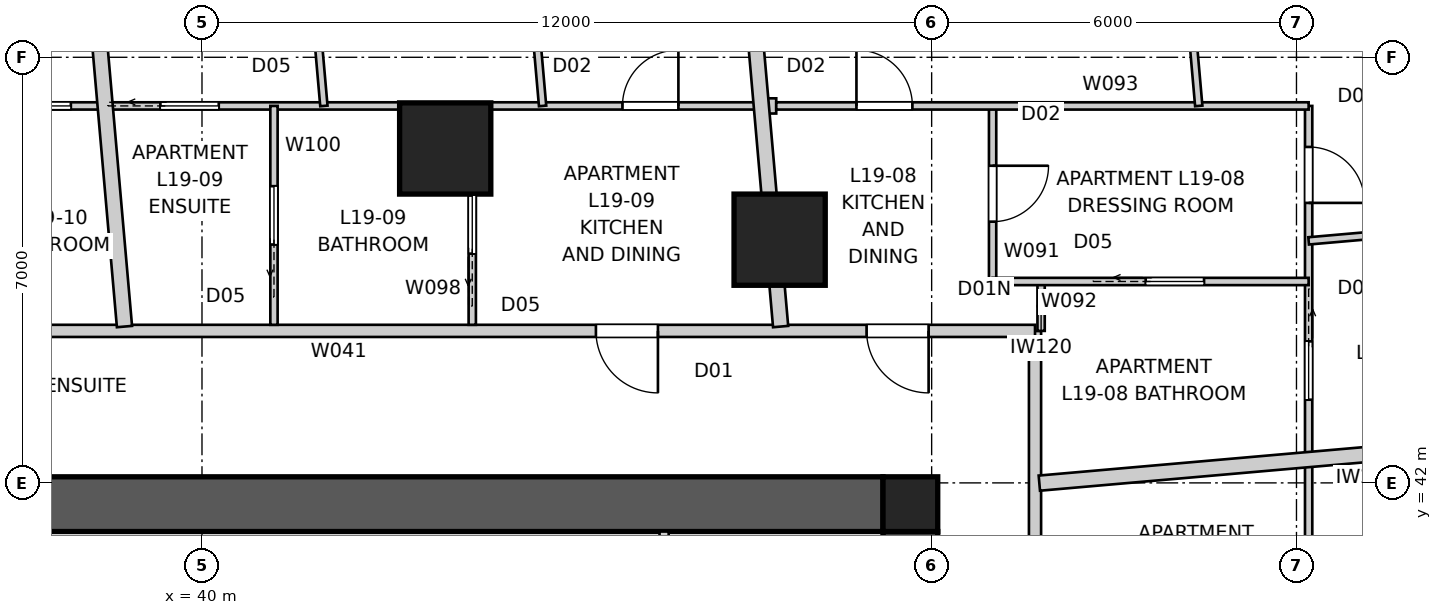
"""IFC4 building model, lengths in metres.
Left out: names, types, materials, properties, quantities, classifications, styles, units other than length and angle.
Written with IfcOpenShell. Run it as: python <this file> out.ifc"""

import sys

from ifc_helpers import new_model, si_unit, direction, frame, frame_2d, origin, origin_2d, place, context, subcontext, project, spatial, polyline, rectangle, outline, extrude, element, fill, save


model = new_model("IFC4")
c1 = context("Model", 3, precision=1e-05, world=origin(), true_north=direction((0.0, 1.0)))
c2 = subcontext(c1, "Body", "Model", "MODEL_VIEW")
j1 = project(units=[si_unit("LENGTHUNIT", "METRE"), si_unit("PLANEANGLEUNIT", "RADIAN")], contexts=[c1])
p1 = place(None, origin())
s1 = spatial("IfcSite", under=j1, at=p1, CompositionType="ELEMENT")
p2 = place(p1, origin())
s2 = spatial("IfcBuilding", under=s1, at=p2, CompositionType="ELEMENT")
p3 = place(p2, frame((0.0, 0.0, 71.0)))
s3 = spatial("IfcBuildingStorey", under=s2, at=p3, CompositionType="ELEMENT", Elevation=71.0)
p4 = place(p3, frame((28.8, 41.65, 0.0), z_axis=(0.0, 0.0, 1.0), x_axis=(1.0, 0.0, 0.0)))
e1 = element("IfcWall", 1, at=p4, inside=s3, PredefinedType="SHEAR", context=c2, shape_type="SweptSolid", body=[
    extrude(outline(polyline([(0.0, -0.45), (22.4, -0.45), (22.4, -0.025), (22.85, -0.025), (22.85, 0.025), (22.4, 0.025), (22.4, 0.45), (0.0, 0.45), (0.0, 0.025), (-0.45, 0.025), (-0.45, -0.025), (0.0, -0.025), (0.0, -0.45)])), origin(), (0.0, 0.0, 1.0), 3.4),
])
p5 = place(p3, frame((51.65, 18.8, 0.0), z_axis=(0.0, 0.0, 1.0), x_axis=(0.0, 1.0, 0.0)))
e2 = element("IfcWall", 2, at=p5, inside=s3, PredefinedType="SHEAR", context=c2, shape_type="SweptSolid", body=[
    extrude(outline(polyline([(0.0, -0.45), (22.4, -0.45), (22.4, -0.025), (22.85, -0.025), (22.85, 0.025), (22.4, 0.025), (22.4, 0.45), (0.0, 0.45), (0.0, 0.025), (-0.45, 0.025), (-0.45, -0.025), (0.0, -0.025), (0.0, -0.45)])), origin(), (0.0, 0.0, 1.0), 3.4),
])
p6 = place(p5, frame((11.14, 0.0, 0.0)))
e3 = element("IfcOpeningElement", 3, at=p6, cuts=e2, PredefinedType="OPENING", context=c2, shape_type="SweptSolid", body=[
    extrude(rectangle(XDim=1.02, YDim=2.4, at=frame_2d((0.51, 1.2))), frame((0.0, 0.46, 0.0), z_axis=(0.0, -1.0, 0.0), x_axis=(1.0, 0.0, 0.0)), (0.0, 0.0, 1.0), 0.92),
])
p7 = place(p3, frame((51.65, 41.65, 0.0), z_axis=(0.0, 0.0, 1.0), x_axis=(1.0, 0.0, 0.0)))
e4 = element("IfcColumn", 4, at=p7, inside=s3, PredefinedType="COLUMN", context=c2, shape_type="SweptSolid", body=[
    extrude(rectangle(XDim=0.9, YDim=0.9, at=origin_2d()), origin(), (0.0, 0.0, 1.0), 3.4),
])
for number, where, z_axis, x_axis in (
    (5, (49.5, 46.0, 0.0), (0.0, 0.0, 1.0), (1.0, 0.0, 0.0)),
    (6, (44.0, 47.5, 0.0), (0.0, 0.0, 1.0), (1.0, 0.0, 0.0)),
):
    element("IfcColumn", number, at=place(p3, frame(where, z_axis=z_axis, x_axis=x_axis)), inside=s3, PredefinedType="COLUMN", context=c2, shape_type="SweptSolid", body=[
        extrude(rectangle(XDim=1.5, YDim=1.5, at=origin_2d()), origin(), (0.0, 0.0, 1.0), 3.4),
    ])
p8 = place(p3, frame((53.7, 16.3, 0.0), z_axis=(0.0, 0.0, 1.0), x_axis=(0.0, 1.0, 0.0)))
e7 = element("IfcWall", 7, at=p8, inside=s3, PredefinedType="PARTITIONING", context=c2, shape_type="SweptSolid", body=[
    extrude(rectangle(XDim=28.2, YDim=0.2, at=frame_2d((14.1, 0.0))), origin(), (0.0, 0.0, 1.0), 3.2),
])
p9 = place(p8, frame((15.716, 0.0, 0.0)))
e8 = element("IfcOpeningElement", 8, at=p9, cuts=e7, PredefinedType="OPENING", context=c2, shape_type="SweptSolid", body=[
    extrude(rectangle(XDim=1.02, YDim=2.34, at=frame_2d((0.51, 1.17))), frame((0.0, 0.11, 0.0), z_axis=(0.0, -1.0, 0.0), x_axis=(1.0, 0.0, 0.0)), (0.0, 0.0, 1.0), 0.22),
])
p10 = place(p8, frame((5.572, 0.0, 0.0)))
e9 = element("IfcOpeningElement", 9, at=p10, cuts=e7, PredefinedType="OPENING", context=c2, shape_type="SweptSolid", body=[
    extrude(rectangle(XDim=1.02, YDim=2.34, at=frame_2d((0.51, 1.17))), frame((0.0, 0.11, 0.0), z_axis=(0.0, -1.0, 0.0), x_axis=(1.0, 0.0, 0.0)), (0.0, 0.0, 1.0), 0.22),
])
p11 = place(p8, frame((1.565, 0.0, 0.0)))
e10 = element("IfcOpeningElement", 10, at=p11, cuts=e7, PredefinedType="OPENING", context=c2, shape_type="SweptSolid", body=[
    extrude(rectangle(XDim=1.02, YDim=2.0, at=frame_2d((0.51, 1.0))), frame((0.0, 0.11, 0.0), z_axis=(0.0, -1.0, 0.0), x_axis=(1.0, 0.0, 0.0)), (0.0, 0.0, 1.0), 0.22),
])
p12 = place(p3, frame((53.7, 44.5, 0.0), z_axis=(0.0, 0.0, 1.0), x_axis=(-1.0, 0.0, 0.0)))
e11 = element("IfcWall", 11, at=p12, inside=s3, PredefinedType="PARTITIONING", context=c2, shape_type="SweptSolid", body=[
    extrude(rectangle(XDim=28.2, YDim=0.2, at=frame_2d((14.1, 0.0))), origin(), (0.0, 0.0, 1.0), 3.2),
])
p13 = place(p12, frame((21.321, 0.0, 0.0)))
e12 = element("IfcOpeningElement", 12, at=p13, cuts=e11, PredefinedType="OPENING", context=c2, shape_type="SweptSolid", body=[
    extrude(rectangle(XDim=1.02, YDim=2.34, at=frame_2d((0.51, 1.17))), frame((0.0, 0.11, 0.0), z_axis=(0.0, -1.0, 0.0), x_axis=(1.0, 0.0, 0.0)), (0.0, 0.0, 1.0), 0.22),
])
p14 = place(p12, frame((6.201, 0.0, 0.0)))
e13 = element("IfcOpeningElement", 13, at=p14, cuts=e11, PredefinedType="OPENING", context=c2, shape_type="SweptSolid", body=[
    extrude(rectangle(XDim=1.02, YDim=2.34, at=frame_2d((0.51, 1.17))), frame((0.0, 0.11, 0.0), z_axis=(0.0, -1.0, 0.0), x_axis=(1.0, 0.0, 0.0)), (0.0, 0.0, 1.0), 0.22),
])
p15 = place(p12, frame((1.75, 0.0, 0.0)))
e14 = element("IfcOpeningElement", 14, at=p15, cuts=e11, PredefinedType="OPENING", context=c2, shape_type="SweptSolid", body=[
    extrude(rectangle(XDim=1.02, YDim=2.0, at=frame_2d((0.51, 1.0))), frame((0.0, 0.11, 0.0), z_axis=(0.0, -1.0, 0.0), x_axis=(1.0, 0.0, 0.0)), (0.0, 0.0, 1.0), 0.22),
])
p16 = place(p3, frame((64.466, 42.932, 0.0), z_axis=(0.0, 0.0, 1.0), x_axis=(-0.996193939644, -0.08716441141, 0.0)))
e15 = element("IfcWall", 15, at=p16, inside=s3, PredefinedType="PARTITIONING", context=c2, shape_type="SweptSolid", body=[
    extrude(rectangle(XDim=10.736, YDim=0.25, at=frame_2d((5.368, 0.0))), origin(), (0.0, 0.0, 1.0), 3.2),
])
p17 = place(p3, frame((48.487, 56.34, 0.0), z_axis=(0.0, 0.0, 1.0), x_axis=(0.087168232078, -0.996193605338, 0.0)))
e16 = element("IfcWall", 16, at=p17, inside=s3, PredefinedType="PARTITIONING", context=c2, shape_type="SweptSolid", body=[
    extrude(rectangle(XDim=11.814, YDim=0.25, at=frame_2d((5.907, 0.0))), origin(), (0.0, 0.0, 1.0), 3.2),
])
p18 = place(p3, frame((37.778, 55.403, 0.0), z_axis=(0.0, 0.0, 1.0), x_axis=(0.087140211333, -0.996196056792, 0.0)))
e17 = element("IfcWall", 17, at=p18, inside=s3, PredefinedType="PARTITIONING", context=c2, shape_type="SweptSolid", body=[
    extrude(rectangle(XDim=10.873, YDim=0.25, at=frame_2d((5.437, 0.0))), origin(), (0.0, 0.0, 1.0), 3.2),
])
p19 = place(p3, frame((47.6, 41.2, 0.0), z_axis=(0.0, 0.0, 1.0), x_axis=(0.0, -1.0, 0.0)))
e18 = element("IfcWall", 18, at=p19, inside=s3, PredefinedType="SOLIDWALL", context=c2, shape_type="SweptSolid", body=[
    extrude(rectangle(XDim=5.9, YDim=0.15, at=frame_2d((2.95, 0.0))), origin(), (0.0, 0.0, 1.0), 3.2),
])
p20 = place(p3, frame((49.223, 48.2, 0.0), z_axis=(0.0, 0.0, 1.0), x_axis=(0.999999388167, -0.001106194013, 0.0)))
e19 = element("IfcWall", 19, at=p20, inside=s3, PredefinedType="PARTITIONING", context=c2, shape_type="SweptSolid", body=[
    extrude(rectangle(XDim=0.221, YDim=0.25, at=frame_2d((0.11, 0.0))), origin(), (0.0, 0.0, 1.0), 3.2),
])
p21 = place(p3, frame((58.2, 48.2, 0.0), z_axis=(0.0, 0.0, 1.0), x_axis=(0.0, -1.0, 0.0)))
e20 = element("IfcWall", 20, at=p21, inside=s3, PredefinedType="PARTITIONING", context=c2, shape_type="SweptSolid", body=[
    extrude(rectangle(XDim=20.7, YDim=0.12, at=frame_2d((10.35, 0.0))), origin(), (0.0, 0.0, 1.0), 3.2),
])
p22 = place(p21, frame((15.095, 0.0, 0.0)))
e21 = element("IfcOpeningElement", 21, at=p22, cuts=e20, PredefinedType="OPENING", context=c2, shape_type="SweptSolid", body=[
    extrude(rectangle(XDim=0.92, YDim=2.34, at=frame_2d((0.46, 1.17))), frame((0.0, 0.07, 0.0), z_axis=(0.0, -1.0, 0.0), x_axis=(1.0, 0.0, 0.0)), (0.0, 0.0, 1.0), 0.14),
])
p23 = place(p21, frame((18.521, 0.0, 0.0)))
e22 = element("IfcOpeningElement", 22, at=p23, cuts=e20, PredefinedType="OPENING", context=c2, shape_type="SweptSolid", body=[
    extrude(rectangle(XDim=0.96, YDim=2.1, at=frame_2d((0.48, 1.05))), frame((0.0, 0.07, 0.0), z_axis=(0.0, -1.0, 0.0), x_axis=(1.0, 0.0, 0.0)), (0.0, 0.0, 1.0), 0.14),
])
p24 = place(p21, frame((0.675, 0.0, 0.0)))
e23 = element("IfcOpeningElement", 23, at=p24, cuts=e20, PredefinedType="OPENING", context=c2, shape_type="SweptSolid", body=[
    extrude(rectangle(XDim=0.92, YDim=2.34, at=frame_2d((0.46, 1.17))), frame((0.0, 0.07, 0.0), z_axis=(0.0, -1.0, 0.0), x_axis=(1.0, 0.0, 0.0)), (0.0, 0.0, 1.0), 0.14),
])
p25 = place(p21, frame((3.872, 0.0, 0.0)))
e24 = element("IfcOpeningElement", 24, at=p25, cuts=e20, PredefinedType="OPENING", context=c2, shape_type="SweptSolid", body=[
    extrude(rectangle(XDim=0.96, YDim=2.1, at=frame_2d((0.48, 1.05))), frame((0.0, 0.07, 0.0), z_axis=(0.0, -1.0, 0.0), x_axis=(1.0, 0.0, 0.0)), (0.0, 0.0, 1.0), 0.14),
])
p26 = place(p3, frame((53.8, 45.312, 0.0), z_axis=(0.0, 0.0, 1.0), x_axis=(0.0, -1.0, 0.0)))
e25 = element("IfcWall", 25, at=p26, inside=s3, PredefinedType="PARTITIONING", context=c2, shape_type="SweptSolid", body=[
    extrude(rectangle(XDim=0.812, YDim=0.12, at=frame_2d((0.406, 0.0))), origin(), (0.0, 0.0, 1.0), 3.2),
])
p27 = place(p3, frame((53.002, 48.2, 0.0), z_axis=(0.0, 0.0, 1.0), x_axis=(0.0, -1.0, 0.0)))
e26 = element("IfcWall", 26, at=p27, inside=s3, PredefinedType="PARTITIONING", context=c2, shape_type="SweptSolid", body=[
    extrude(rectangle(XDim=2.887, YDim=0.12, at=frame_2d((1.444, 0.0))), origin(), (0.0, 0.0, 1.0), 2.399),
])
p28 = place(p27, frame((0.984, 0.0, 0.0)))
e27 = element("IfcOpeningElement", 27, at=p28, cuts=e26, PredefinedType="OPENING", context=c2, shape_type="SweptSolid", body=[
    extrude(rectangle(XDim=0.92, YDim=2.34, at=frame_2d((0.46, 1.17))), frame((0.0, 0.07, 0.0), z_axis=(0.0, -1.0, 0.0), x_axis=(1.0, 0.0, 0.0)), (0.0, 0.0, 1.0), 0.14),
])
p29 = place(p3, frame((53.002, 45.312, 0.0), z_axis=(0.0, 0.0, 1.0), x_axis=(1.0, 0.0, 0.0)))
e28 = element("IfcWall", 28, at=p29, inside=s3, PredefinedType="PARTITIONING", context=c2, shape_type="SweptSolid", body=[
    extrude(rectangle(XDim=5.198, YDim=0.12, at=frame_2d((2.599, 0.0))), origin(), (0.0, 0.0, 1.0), 3.2),
])
p30 = place(p29, frame((2.518, 0.0, 0.0)))
e29 = element("IfcOpeningElement", 29, at=p30, cuts=e28, PredefinedType="OPENING", context=c2, shape_type="SweptSolid", body=[
    extrude(rectangle(XDim=0.96, YDim=2.1, at=frame_2d((0.48, 1.05))), frame((0.0, 0.07, 0.0), z_axis=(0.0, -1.0, 0.0), x_axis=(1.0, 0.0, 0.0)), (0.0, 0.0, 1.0), 0.14),
])
p31 = place(p3, frame((49.444, 48.2, 0.0), z_axis=(0.0, 0.0, 1.0), x_axis=(1.0, 0.0, 0.0)))
e30 = element("IfcWall", 30, at=p31, inside=s3, PredefinedType="PARTITIONING", context=c2, shape_type="SweptSolid", body=[
    extrude(rectangle(XDim=8.756, YDim=0.12, at=frame_2d((4.378, 0.0))), origin(), (0.0, 0.0, 1.0), 3.2),
])
p32 = place(p31, frame((1.319, 0.0, 0.0)))
e31 = element("IfcOpeningElement", 31, at=p32, cuts=e30, PredefinedType="OPENING", context=c2, shape_type="SweptSolid", body=[
    extrude(rectangle(XDim=0.92, YDim=2.34, at=frame_2d((0.46, 1.17))), frame((0.0, 0.07, 0.0), z_axis=(0.0, -1.0, 0.0), x_axis=(1.0, 0.0, 0.0)), (0.0, 0.0, 1.0), 0.14),
])
p33 = place(p3, frame((55.629, 56.925, 0.0), z_axis=(0.0, 0.0, 1.0), x_axis=(0.087169716747, -0.996193475426, 0.0)))
e32 = element("IfcWall", 32, at=p33, inside=s3, PredefinedType="PARTITIONING", context=c2, shape_type="SweptSolid", body=[
    extrude(rectangle(XDim=8.758, YDim=0.12, at=frame_2d((4.379, 0.0))), origin(), (0.0, 0.0, 1.0), 3.2),
])
p34 = place(p33, frame((1.525, 0.0, 0.0)))
e33 = element("IfcOpeningElement", 33, at=p34, cuts=e32, PredefinedType="OPENING", context=c2, shape_type="SweptSolid", body=[
    extrude(rectangle(XDim=0.92, YDim=2.34, at=frame_2d((0.46, 1.17))), frame((0.0, 0.07, 0.0), z_axis=(0.0, -1.0, 0.0), x_axis=(1.0, 0.0, 0.0)), (0.0, 0.0, 1.0), 0.14),
])
p35 = place(p33, frame((5.292, 0.0, 0.0)))
e34 = element("IfcOpeningElement", 34, at=p35, cuts=e32, PredefinedType="OPENING", context=c2, shape_type="SweptSolid", body=[
    extrude(rectangle(XDim=0.92, YDim=2.34, at=frame_2d((0.46, 1.17))), frame((0.0, 0.07, 0.0), z_axis=(0.0, -1.0, 0.0), x_axis=(1.0, 0.0, 0.0)), (0.0, 0.0, 1.0), 0.14),
])
p36 = place(p3, frame((64.114, 46.498, 0.0), z_axis=(0.0, 0.0, 1.0), x_axis=(-0.996195547509, -0.087146033323, 0.0)))
e35 = element("IfcWall", 35, at=p36, inside=s3, PredefinedType="PARTITIONING", context=c2, shape_type="SweptSolid", body=[
    extrude(rectangle(XDim=5.937, YDim=0.12, at=frame_2d((2.968, 0.0))), origin(), (0.0, 0.0, 1.0), 2.399),
])
p37 = place(p3, frame((44.445, 44.6, 0.0), z_axis=(0.0, 0.0, 1.0), x_axis=(0.0, 1.0, 0.0)))
e36 = element("IfcWall", 36, at=p37, inside=s3, PredefinedType="PARTITIONING", context=c2, shape_type="SweptSolid", body=[
    extrude(rectangle(XDim=3.6, YDim=0.12, at=frame_2d((1.8, 0.0))), origin(), (0.0, 0.0, 1.0), 3.2),
])
p38 = place(p37, frame((1.17, 0.0, 0.0)))
e37 = element("IfcOpeningElement", 37, at=p38, cuts=e36, PredefinedType="OPENING", context=c2, shape_type="SweptSolid", body=[
    extrude(rectangle(XDim=0.96, YDim=2.1, at=frame_2d((0.48, 1.05))), frame((0.0, 0.07, 0.0), z_axis=(0.0, -1.0, 0.0), x_axis=(1.0, 0.0, 0.0)), (0.0, 0.0, 1.0), 0.14),
])
p39 = place(p3, frame((21.8, 48.2, 0.0), z_axis=(0.0, 0.0, 1.0), x_axis=(1.0, 0.0, 0.0)))
e38 = element("IfcWall", 38, at=p39, inside=s3, PredefinedType="PARTITIONING", context=c2, shape_type="SweptSolid", body=[
    extrude(rectangle(XDim=27.399, YDim=0.12, at=frame_2d((13.699, 0.0))), origin(), (0.0, 0.0, 1.0), 3.2),
])
p40 = place(p39, frame((7.18, 0.0, 0.0)))
e39 = element("IfcOpeningElement", 39, at=p40, cuts=e38, PredefinedType="OPENING", context=c2, shape_type="SweptSolid", body=[
    extrude(rectangle(XDim=0.92, YDim=2.34, at=frame_2d((0.46, 1.17))), frame((0.0, 0.07, 0.0), z_axis=(0.0, -1.0, 0.0), x_axis=(1.0, 0.0, 0.0)), (0.0, 0.0, 1.0), 0.14),
])
p41 = place(p39, frame((10.167, 0.0, 0.0)))
e40 = element("IfcOpeningElement", 40, at=p41, cuts=e38, PredefinedType="OPENING", context=c2, shape_type="SweptSolid", body=[
    extrude(rectangle(XDim=0.92, YDim=2.34, at=frame_2d((0.46, 1.17))), frame((0.0, 0.07, 0.0), z_axis=(0.0, -1.0, 0.0), x_axis=(1.0, 0.0, 0.0)), (0.0, 0.0, 1.0), 0.14),
])
p42 = place(p39, frame((25.115, 0.0, 0.0)))
e41 = element("IfcOpeningElement", 41, at=p42, cuts=e38, PredefinedType="OPENING", context=c2, shape_type="SweptSolid", body=[
    extrude(rectangle(XDim=0.92, YDim=2.34, at=frame_2d((0.46, 1.17))), frame((0.0, 0.07, 0.0), z_axis=(0.0, -1.0, 0.0), x_axis=(1.0, 0.0, 0.0)), (0.0, 0.0, 1.0), 0.14),
])
p43 = place(p39, frame((3.513, 0.0, 0.0)))
e42 = element("IfcOpeningElement", 42, at=p43, cuts=e38, PredefinedType="OPENING", context=c2, shape_type="SweptSolid", body=[
    extrude(rectangle(XDim=0.96, YDim=2.1, at=frame_2d((0.48, 1.05))), frame((0.0, 0.07, 0.0), z_axis=(0.0, -1.0, 0.0), x_axis=(1.0, 0.0, 0.0)), (0.0, 0.0, 1.0), 0.14),
])
p44 = place(p39, frame((0.655, 0.0, 0.0)))
e43 = element("IfcOpeningElement", 43, at=p44, cuts=e38, PredefinedType="OPENING", context=c2, shape_type="SweptSolid", body=[
    extrude(rectangle(XDim=0.96, YDim=2.1, at=frame_2d((0.48, 1.05))), frame((0.0, 0.07, 0.0), z_axis=(0.0, -1.0, 0.0), x_axis=(1.0, 0.0, 0.0)), (0.0, 0.0, 1.0), 0.14),
])
p45 = place(p39, frame((15.083, 0.0, 0.0)))
e44 = element("IfcOpeningElement", 44, at=p45, cuts=e38, PredefinedType="OPENING", context=c2, shape_type="SweptSolid", body=[
    extrude(rectangle(XDim=0.96, YDim=2.1, at=frame_2d((0.48, 1.05))), frame((0.0, 0.07, 0.0), z_axis=(0.0, -1.0, 0.0), x_axis=(1.0, 0.0, 0.0)), (0.0, 0.0, 1.0), 0.14),
])
p46 = place(p39, frame((17.516, 0.0, 0.0)))
e45 = element("IfcOpeningElement", 45, at=p46, cuts=e38, PredefinedType="OPENING", context=c2, shape_type="SweptSolid", body=[
    extrude(rectangle(XDim=0.96, YDim=2.1, at=frame_2d((0.48, 1.05))), frame((0.0, 0.07, 0.0), z_axis=(0.0, -1.0, 0.0), x_axis=(1.0, 0.0, 0.0)), (0.0, 0.0, 1.0), 0.14),
])
p47 = place(p3, frame((41.184, 44.6, 0.0), z_axis=(0.0, 0.0, 1.0), x_axis=(0.0, 1.0, 0.0)))
e46 = element("IfcWall", 46, at=p47, inside=s3, PredefinedType="PARTITIONING", context=c2, shape_type="SweptSolid", body=[
    extrude(rectangle(XDim=3.6, YDim=0.12, at=frame_2d((1.8, 0.0))), origin(), (0.0, 0.0, 1.0), 3.2),
])
p48 = place(p47, frame((1.32, 0.0, 0.0)))
e47 = element("IfcOpeningElement", 47, at=p48, cuts=e46, PredefinedType="OPENING", context=c2, shape_type="SweptSolid", body=[
    extrude(rectangle(XDim=0.96, YDim=2.1, at=frame_2d((0.48, 1.05))), frame((0.0, 0.07, 0.0), z_axis=(0.0, -1.0, 0.0), x_axis=(1.0, 0.0, 0.0)), (0.0, 0.0, 1.0), 0.14),
])
p49 = place(p3, frame((45.602, 48.2, 0.0), z_axis=(0.0, 0.0, 1.0), x_axis=(-0.087161914023, 0.996194158156, 0.0)))
e48 = element("IfcWall", 48, at=p49, inside=s3, PredefinedType="PARTITIONING", context=c2, shape_type="SweptSolid", body=[
    extrude(rectangle(XDim=7.818, YDim=0.12, at=frame_2d((3.909, 0.0))), origin(), (0.0, 0.0, 1.0), 2.588),
])
p50 = place(p49, frame((3.469, 0.0, 0.0)))
e49 = element("IfcOpeningElement", 49, at=p50, cuts=e48, PredefinedType="OPENING", context=c2, shape_type="SweptSolid", body=[
    extrude(rectangle(XDim=0.92, YDim=2.34, at=frame_2d((0.46, 1.17))), frame((0.0, 0.07, 0.0), z_axis=(0.0, -1.0, 0.0), x_axis=(1.0, 0.0, 0.0)), (0.0, 0.0, 1.0), 0.14),
])
p51 = place(p3, frame((42.005, 48.2, 0.0), z_axis=(0.0, 0.0, 1.0), x_axis=(-0.08715887855, 0.99619442374, 0.0)))
e50 = element("IfcWall", 50, at=p51, inside=s3, PredefinedType="PARTITIONING", context=c2, shape_type="SweptSolid", body=[
    extrude(rectangle(XDim=7.504, YDim=0.12, at=frame_2d((3.752, 0.0))), origin(), (0.0, 0.0, 1.0), 3.2),
])
p52 = place(p14, origin())
e51 = element("IfcDoor", 51, at=p52, inside=s3, OperationType="SINGLE_SWING_LEFT", PredefinedType="DOOR", context=c2, shape_type="SweptSolid", body=[
    extrude(rectangle(XDim=1.02, YDim=2.34, at=frame_2d((0.51, 1.17))), frame((0.0, 0.025, 0.0), z_axis=(0.0, -1.0, 0.0), x_axis=(1.0, 0.0, 0.0)), (0.0, 0.0, 1.0), 0.05),
])
fill(e13, e51)
p53 = place(p15, origin())
e52 = element("IfcDoor", 52, at=p53, inside=s3, OperationType="SINGLE_SWING_LEFT", PredefinedType="DOOR", context=c2, shape_type="SweptSolid", body=[
    extrude(rectangle(XDim=1.02, YDim=2.0, at=frame_2d((0.51, 1.0))), frame((0.0, 0.025, 0.0), z_axis=(0.0, -1.0, 0.0), x_axis=(1.0, 0.0, 0.0)), (0.0, 0.0, 1.0), 0.05),
])
fill(e14, e52)
p54 = place(p42, origin())
e53 = element("IfcDoor", 53, at=p54, inside=s3, OperationType="SINGLE_SWING_RIGHT", PredefinedType="DOOR", context=c2, shape_type="SweptSolid", body=[
    extrude(rectangle(XDim=0.92, YDim=2.34, at=frame_2d((0.46, 1.17))), frame((0.0, 0.025, 0.0), z_axis=(0.0, -1.0, 0.0), x_axis=(1.0, 0.0, 0.0)), (0.0, 0.0, 1.0), 0.05),
])
fill(e41, e53)
p55 = place(p38, origin())
e54 = element("IfcDoor", 54, at=p55, inside=s3, OperationType="SLIDING_TO_LEFT", PredefinedType="DOOR", context=c2, shape_type="SweptSolid", body=[
    extrude(rectangle(XDim=0.96, YDim=2.1, at=frame_2d((0.48, 1.05))), frame((0.0, 0.025, 0.0), z_axis=(0.0, -1.0, 0.0), x_axis=(1.0, 0.0, 0.0)), (0.0, 0.0, 1.0), 0.05),
])
fill(e37, e54)
p56 = place(p32, origin())
e55 = element("IfcDoor", 55, at=p56, inside=s3, OperationType="SINGLE_SWING_LEFT", PredefinedType="DOOR", context=c2, shape_type="SweptSolid", body=[
    extrude(rectangle(XDim=0.92, YDim=2.34, at=frame_2d((0.46, 1.17))), frame((0.0, 0.025, 0.0), z_axis=(0.0, -1.0, 0.0), x_axis=(1.0, 0.0, 0.0)), (0.0, 0.0, 1.0), 0.05),
])
fill(e31, e55)
p57 = place(p28, origin())
e56 = element("IfcDoor", 56, at=p57, inside=s3, OperationType="SINGLE_SWING_LEFT", PredefinedType="DOOR", context=c2, shape_type="SweptSolid", body=[
    extrude(rectangle(XDim=0.92, YDim=2.34, at=frame_2d((0.46, 1.17))), frame((0.0, 0.025, 0.0), z_axis=(0.0, -1.0, 0.0), x_axis=(1.0, 0.0, 0.0)), (0.0, 0.0, 1.0), 0.05),
])
fill(e27, e56)
p58 = place(p48, origin())
e57 = element("IfcDoor", 57, at=p58, inside=s3, OperationType="SLIDING_TO_LEFT", PredefinedType="DOOR", context=c2, shape_type="SweptSolid", body=[
    extrude(rectangle(XDim=0.96, YDim=2.1, at=frame_2d((0.48, 1.05))), frame((0.0, 0.025, 0.0), z_axis=(0.0, -1.0, 0.0), x_axis=(1.0, 0.0, 0.0)), (0.0, 0.0, 1.0), 0.05),
])
fill(e47, e57)
p59 = place(p30, origin())
e58 = element("IfcDoor", 58, at=p59, inside=s3, OperationType="SLIDING_TO_LEFT", PredefinedType="DOOR", context=c2, shape_type="SweptSolid", body=[
    extrude(rectangle(XDim=0.96, YDim=2.1, at=frame_2d((0.48, 1.05))), frame((0.0, 0.025, 0.0), z_axis=(0.0, -1.0, 0.0), x_axis=(1.0, 0.0, 0.0)), (0.0, 0.0, 1.0), 0.05),
])
fill(e29, e58)
p60 = place(p24, origin())
e59 = element("IfcDoor", 59, at=p60, inside=s3, OperationType="SINGLE_SWING_RIGHT", PredefinedType="DOOR", context=c2, shape_type="SweptSolid", body=[
    extrude(rectangle(XDim=0.92, YDim=2.34, at=frame_2d((0.46, 1.17))), frame((0.0, 0.025, 0.0), z_axis=(0.0, -1.0, 0.0), x_axis=(1.0, 0.0, 0.0)), (0.0, 0.0, 1.0), 0.05),
])
fill(e23, e59)
p61 = place(p45, origin())
e60 = element("IfcDoor", 60, at=p61, inside=s3, OperationType="SLIDING_TO_LEFT", PredefinedType="DOOR", context=c2, shape_type="SweptSolid", body=[
    extrude(rectangle(XDim=0.96, YDim=2.1, at=frame_2d((0.48, 1.05))), frame((0.0, 0.025, 0.0), z_axis=(0.0, -1.0, 0.0), x_axis=(1.0, 0.0, 0.0)), (0.0, 0.0, 1.0), 0.05),
])
fill(e44, e60)
p62 = place(p46, origin())
e61 = element("IfcDoor", 61, at=p62, inside=s3, OperationType="SLIDING_TO_LEFT", PredefinedType="DOOR", context=c2, shape_type="SweptSolid", body=[
    extrude(rectangle(XDim=0.96, YDim=2.1, at=frame_2d((0.48, 1.05))), frame((0.0, 0.025, 0.0), z_axis=(0.0, -1.0, 0.0), x_axis=(1.0, 0.0, 0.0)), (0.0, 0.0, 1.0), 0.05),
])
fill(e45, e61)
p63 = place(p25, origin())
e62 = element("IfcDoor", 62, at=p63, inside=s3, OperationType="SLIDING_TO_LEFT", PredefinedType="DOOR", context=c2, shape_type="SweptSolid", body=[
    extrude(rectangle(XDim=0.96, YDim=2.1, at=frame_2d((0.48, 1.05))), frame((0.0, 0.025, 0.0), z_axis=(0.0, -1.0, 0.0), x_axis=(1.0, 0.0, 0.0)), (0.0, 0.0, 1.0), 0.05),
])
fill(e24, e62)
save(model, sys.argv[1])
